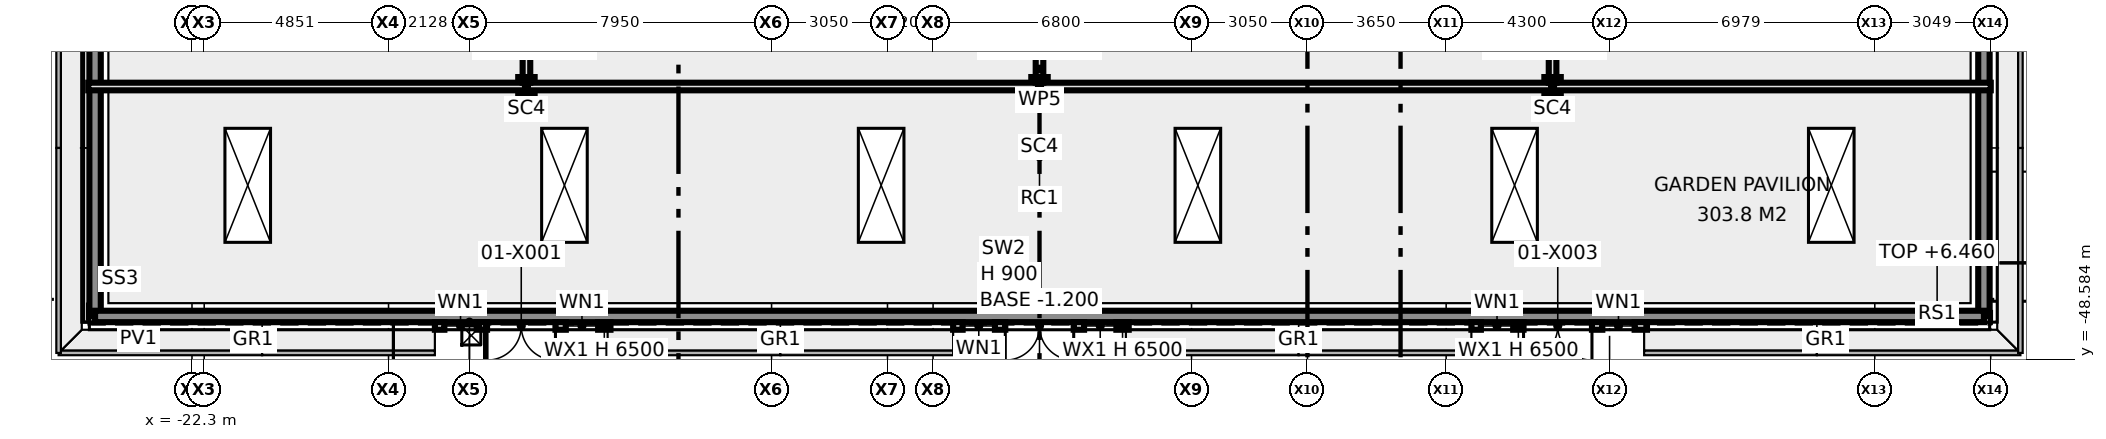
"""IFC4 building model, lengths in metres.
Left out: names, types, materials, properties, quantities, classifications, styles, units other than length and angle.
Written with IfcOpenShell. Run it as: python <this file> out.ifc"""

import sys

from ifc_helpers import new_model, si_unit, direction, frame, frame_2d, origin, origin_2d, place, context, subcontext, project, spatial, rectangle, i_section, extrude, element, fill, save


model = new_model("IFC4")
c1 = context("Model", 3, precision=1e-05, world=origin(), true_north=direction((0.0, 1.0)))
c2 = subcontext(c1, "Body", "Model", "MODEL_VIEW")
j1 = project(units=[si_unit("LENGTHUNIT", "METRE"), si_unit("PLANEANGLEUNIT", "RADIAN")], contexts=[c1])
p1 = place(None, origin())
s1 = spatial("IfcSite", under=j1, at=p1, CompositionType="ELEMENT")
p2 = place(p1, origin())
s2 = spatial("IfcBuilding", under=s1, at=p2, CompositionType="ELEMENT")
p3 = place(p2, origin())
s3 = spatial("IfcBuildingStorey", under=s2, at=p3, CompositionType="ELEMENT", Elevation=0.0)
for number, where, z_axis, x_axis in (
    (1, (-13.5, -41.4, -1.2), (0.0, 0.0, 1.0), (1.0, 0.0, 0.0)),
    (2, (0.0, -41.4, -1.2), (0.0, 0.0, 1.0), (1.0, 0.0, 0.0)),
    (3, (13.5, -41.4, -1.2), (0.0, 0.0, 1.0), (1.0, 0.0, 0.0)),
):
    element("IfcColumn", number, at=place(p3, frame(where, z_axis=z_axis, x_axis=x_axis)), inside=s3, PredefinedType="COLUMN", context=c2, shape_type="SweptSolid", body=[
        extrude(i_section(OverallWidth=0.432, OverallDepth=0.498, WebThickness=0.056, FlangeThickness=0.089, FilletRadius=0.015, at=origin_2d()), origin(), (0.0, 0.0, 1.0), 7.7),
    ])
for number, where, z_axis, x_axis in (
    (4, (-24.85, -47.45, -1.2), (0.0, 0.0, 1.0), (0.0, 1.0, 0.0)),
    (5, (24.85, -24.128, -1.2), (0.0, 0.0, 1.0), (0.0, -1.0, 0.0)),
):
    element("IfcWall", number, at=place(p3, frame(where, z_axis=z_axis, x_axis=x_axis)), inside=s3, PredefinedType="SOLIDWALL", context=c2, shape_type="SweptSolid", body=[
        extrude(rectangle(XDim=23.322, YDim=0.3, at=frame_2d((11.661, 0.0))), origin(), (0.0, 0.0, 1.0), 0.9),
    ])
p4 = place(p3, frame((24.85, -47.45, -1.2), z_axis=(0.0, 0.0, 1.0), x_axis=(-1.0, 0.0, 0.0)))
e6 = element("IfcWall", 6, at=p4, inside=s3, PredefinedType="SOLIDWALL", context=c2, shape_type="SweptSolid", body=[
    extrude(rectangle(XDim=49.7, YDim=0.3, at=frame_2d((24.85, 0.0))), origin(), (0.0, 0.0, 1.0), 0.9),
])
p5 = place(p3, frame((-15.909, -47.7, 0.0), z_axis=(0.0, 0.0, 1.0), x_axis=(1.0, 0.0, 0.0)))
e7 = element("IfcWall", 7, at=p5, inside=s3, PredefinedType="STANDARD", context=c2, shape_type="SweptSolid", body=[
    extrude(rectangle(XDim=4.621, YDim=0.2, at=frame_2d((2.31, 0.0))), origin(), (0.0, 0.0, 1.0), 6.5),
])
p6 = place(p5, frame((1.373, 0.0, 0.0)))
e8 = element("IfcOpeningElement", 8, at=p6, cuts=e7, PredefinedType="OPENING", context=c2, shape_type="SweptSolid", body=[
    extrude(rectangle(XDim=1.8, YDim=2.4, at=frame_2d((0.9, 1.2))), frame((0.0, 0.11, 0.0), z_axis=(0.0, -1.0, 0.0), x_axis=(1.0, 0.0, 0.0)), (0.0, 0.0, 1.0), 0.22),
])
p7 = place(p5, frame((0.25, 0.0, 0.0)))
e9 = element("IfcOpeningElement", 9, at=p7, cuts=e7, PredefinedType="OPENING", context=c2, shape_type="SweptSolid", body=[
    extrude(rectangle(XDim=0.85, YDim=2.4, at=frame_2d((0.425, 1.2))), frame((0.0, 0.11, 0.0), z_axis=(0.0, -1.0, 0.0), x_axis=(1.0, 0.0, 0.0)), (0.0, 0.0, 1.0), 0.22),
])
p8 = place(p5, frame((3.446, 0.0, 0.0)))
e10 = element("IfcOpeningElement", 10, at=p8, cuts=e7, PredefinedType="OPENING", context=c2, shape_type="SweptSolid", body=[
    extrude(rectangle(XDim=0.85, YDim=2.4, at=frame_2d((0.425, 1.2))), frame((0.0, 0.11, 0.0), z_axis=(0.0, -1.0, 0.0), x_axis=(1.0, 0.0, 0.0)), (0.0, 0.0, 1.0), 0.22),
])
p9 = place(p3, frame((-2.273, -47.7, 0.0), z_axis=(0.0, 0.0, 1.0), x_axis=(1.0, 0.0, 0.0)))
e11 = element("IfcWall", 11, at=p9, inside=s3, PredefinedType="STANDARD", context=c2, shape_type="SweptSolid", body=[
    extrude(rectangle(XDim=4.62, YDim=0.2, at=frame_2d((2.31, 0.0))), origin(), (0.0, 0.0, 1.0), 6.5),
])
p10 = place(p9, frame((1.373, 0.0, 0.0)))
e12 = element("IfcOpeningElement", 12, at=p10, cuts=e11, PredefinedType="OPENING", context=c2, shape_type="SweptSolid", body=[
    extrude(rectangle(XDim=1.8, YDim=2.4, at=frame_2d((0.9, 1.2))), frame((0.0, 0.11, 0.0), z_axis=(0.0, -1.0, 0.0), x_axis=(1.0, 0.0, 0.0)), (0.0, 0.0, 1.0), 0.22),
])
p11 = place(p9, frame((0.25, 0.0, 0.0)))
e13 = element("IfcOpeningElement", 13, at=p11, cuts=e11, PredefinedType="OPENING", context=c2, shape_type="SweptSolid", body=[
    extrude(rectangle(XDim=0.85, YDim=2.4, at=frame_2d((0.425, 1.2))), frame((0.0, 0.11, 0.0), z_axis=(0.0, -1.0, 0.0), x_axis=(1.0, 0.0, 0.0)), (0.0, 0.0, 1.0), 0.22),
])
p12 = place(p9, frame((3.446, 0.0, 0.0)))
e14 = element("IfcOpeningElement", 14, at=p12, cuts=e11, PredefinedType="OPENING", context=c2, shape_type="SweptSolid", body=[
    extrude(rectangle(XDim=0.85, YDim=2.4, at=frame_2d((0.425, 1.2))), frame((0.0, 0.11, 0.0), z_axis=(0.0, -1.0, 0.0), x_axis=(1.0, 0.0, 0.0)), (0.0, 0.0, 1.0), 0.22),
])
p13 = place(p3, frame((11.364, -47.7, 0.0), z_axis=(0.0, 0.0, 1.0), x_axis=(1.0, 0.0, 0.0)))
e15 = element("IfcWall", 15, at=p13, inside=s3, PredefinedType="STANDARD", context=c2, shape_type="SweptSolid", body=[
    extrude(rectangle(XDim=4.621, YDim=0.2, at=frame_2d((2.31, 0.0))), origin(), (0.0, 0.0, 1.0), 6.5),
])
p14 = place(p13, frame((1.373, 0.0, 0.0)))
e16 = element("IfcOpeningElement", 16, at=p14, cuts=e15, PredefinedType="OPENING", context=c2, shape_type="SweptSolid", body=[
    extrude(rectangle(XDim=1.8, YDim=2.4, at=frame_2d((0.9, 1.2))), frame((0.0, 0.11, 0.0), z_axis=(0.0, -1.0, 0.0), x_axis=(1.0, 0.0, 0.0)), (0.0, 0.0, 1.0), 0.22),
])
p15 = place(p13, frame((0.25, 0.0, 0.0)))
e17 = element("IfcOpeningElement", 17, at=p15, cuts=e15, PredefinedType="OPENING", context=c2, shape_type="SweptSolid", body=[
    extrude(rectangle(XDim=0.85, YDim=2.4, at=frame_2d((0.425, 1.2))), frame((0.0, 0.11, 0.0), z_axis=(0.0, -1.0, 0.0), x_axis=(1.0, 0.0, 0.0)), (0.0, 0.0, 1.0), 0.22),
])
p16 = place(p13, frame((3.446, 0.0, 0.0)))
e18 = element("IfcOpeningElement", 18, at=p16, cuts=e15, PredefinedType="OPENING", context=c2, shape_type="SweptSolid", body=[
    extrude(rectangle(XDim=0.85, YDim=2.4, at=frame_2d((0.425, 1.2))), frame((0.0, 0.11, 0.0), z_axis=(0.0, -1.0, 0.0), x_axis=(1.0, 0.0, 0.0)), (0.0, 0.0, 1.0), 0.22),
])
p17 = place(p3, frame((-14.95, -47.95, -0.5), z_axis=(0.0, 0.0, 1.0), x_axis=(1.0, 0.0, 0.0)))
e19 = element("IfcColumn", 19, at=p17, inside=s3, PredefinedType="COLUMN", context=c2, shape_type="SweptSolid", body=[
    extrude(rectangle(XDim=0.4, YDim=0.4, at=origin_2d()), origin(), (0.0, 0.0, 1.0), 6.7),
])
p18 = place(p3, frame((-25.03, -41.4, 0.0), z_axis=(0.0, 0.0, 1.0), x_axis=(1.0, 0.0, 0.0)))
e20 = element("IfcWall", 20, at=p18, inside=s3, PredefinedType="PARTITIONING", context=c2, shape_type="SweptSolid", body=[
    extrude(rectangle(XDim=50.06, YDim=0.2, at=frame_2d((25.03, 0.0))), origin(), (0.0, 0.0, 1.0), 6.275),
])
for number, where, z_axis, x_axis in (
    (21, (13.5, -41.3, 0.0), (0.0, 0.0, 1.0), (0.0, 1.0, 0.0)),
    (22, (0.0, -41.3, 0.0), (0.0, 0.0, 1.0), (0.0, 1.0, 0.0)),
    (23, (-13.5, -41.3, 0.0), (0.0, 0.0, 1.0), (0.0, 1.0, 0.0)),
):
    element("IfcWall", number, at=place(p3, frame(where, z_axis=z_axis, x_axis=x_axis)), inside=s3, PredefinedType="PARTITIONING", context=c2, shape_type="SweptSolid", body=[
        extrude(rectangle(XDim=1.9, YDim=0.2, at=frame_2d((0.95, 0.0))), origin(), (0.0, 0.0, 1.0), 5.593),
    ])
p19 = place(p6, frame((1.8, 0.0, 0.0), z_axis=(0.0, 0.0, 1.0), x_axis=(-1.0, 0.0, 0.0)))
e24 = element("IfcDoor", 24, at=p19, inside=s3, OperationType="DOUBLE_DOOR_DOUBLE_SWING", PredefinedType="DOOR", context=c2, shape_type="SweptSolid", body=[
    extrude(rectangle(XDim=1.8, YDim=2.4, at=frame_2d((0.9, 1.2))), frame((0.0, 0.025, 0.0), z_axis=(0.0, -1.0, 0.0), x_axis=(1.0, 0.0, 0.0)), (0.0, 0.0, 1.0), 0.05),
])
fill(e8, e24)
p20 = place(p7, origin())
e25 = element("IfcWindow", 25, at=p20, inside=s3, PartitioningType="SINGLE_PANEL", PredefinedType="WINDOW", context=c2, shape_type="SweptSolid", body=[
    extrude(rectangle(XDim=0.85, YDim=2.4, at=frame_2d((0.425, 1.2))), frame((0.0, 0.03, 0.0), z_axis=(0.0, -1.0, 0.0), x_axis=(1.0, 0.0, 0.0)), (0.0, 0.0, 1.0), 0.06),
])
fill(e9, e25)
p21 = place(p8, origin())
e26 = element("IfcWindow", 26, at=p21, inside=s3, PartitioningType="SINGLE_PANEL", PredefinedType="WINDOW", context=c2, shape_type="SweptSolid", body=[
    extrude(rectangle(XDim=0.85, YDim=2.4, at=frame_2d((0.425, 1.2))), frame((0.0, 0.03, 0.0), z_axis=(0.0, -1.0, 0.0), x_axis=(1.0, 0.0, 0.0)), (0.0, 0.0, 1.0), 0.06),
])
fill(e10, e26)
p22 = place(p10, frame((1.8, 0.0, 0.0), z_axis=(0.0, 0.0, 1.0), x_axis=(-1.0, 0.0, 0.0)))
e27 = element("IfcDoor", 27, at=p22, inside=s3, OperationType="DOUBLE_DOOR_DOUBLE_SWING", PredefinedType="DOOR", context=c2, shape_type="SweptSolid", body=[
    extrude(rectangle(XDim=1.8, YDim=2.4, at=frame_2d((0.9, 1.2))), frame((0.0, 0.025, 0.0), z_axis=(0.0, -1.0, 0.0), x_axis=(1.0, 0.0, 0.0)), (0.0, 0.0, 1.0), 0.05),
])
fill(e12, e27)
p23 = place(p11, origin())
e28 = element("IfcWindow", 28, at=p23, inside=s3, PartitioningType="SINGLE_PANEL", PredefinedType="WINDOW", context=c2, shape_type="SweptSolid", body=[
    extrude(rectangle(XDim=0.85, YDim=2.4, at=frame_2d((0.425, 1.2))), frame((0.0, 0.03, 0.0), z_axis=(0.0, -1.0, 0.0), x_axis=(1.0, 0.0, 0.0)), (0.0, 0.0, 1.0), 0.06),
])
fill(e13, e28)
p24 = place(p12, origin())
e29 = element("IfcWindow", 29, at=p24, inside=s3, PartitioningType="SINGLE_PANEL", PredefinedType="WINDOW", context=c2, shape_type="SweptSolid", body=[
    extrude(rectangle(XDim=0.85, YDim=2.4, at=frame_2d((0.425, 1.2))), frame((0.0, 0.03, 0.0), z_axis=(0.0, -1.0, 0.0), x_axis=(1.0, 0.0, 0.0)), (0.0, 0.0, 1.0), 0.06),
])
fill(e14, e29)
p25 = place(p14, frame((1.8, 0.0, 0.0), z_axis=(0.0, 0.0, 1.0), x_axis=(-1.0, 0.0, 0.0)))
e30 = element("IfcDoor", 30, at=p25, inside=s3, OperationType="DOUBLE_DOOR_DOUBLE_SWING", PredefinedType="DOOR", context=c2, shape_type="SweptSolid", body=[
    extrude(rectangle(XDim=1.8, YDim=2.4, at=frame_2d((0.9, 1.2))), frame((0.0, 0.025, 0.0), z_axis=(0.0, -1.0, 0.0), x_axis=(1.0, 0.0, 0.0)), (0.0, 0.0, 1.0), 0.05),
])
fill(e16, e30)
p26 = place(p15, origin())
e31 = element("IfcWindow", 31, at=p26, inside=s3, PartitioningType="SINGLE_PANEL", PredefinedType="WINDOW", context=c2, shape_type="SweptSolid", body=[
    extrude(rectangle(XDim=0.85, YDim=2.4, at=frame_2d((0.425, 1.2))), frame((0.0, 0.03, 0.0), z_axis=(0.0, -1.0, 0.0), x_axis=(1.0, 0.0, 0.0)), (0.0, 0.0, 1.0), 0.06),
])
fill(e17, e31)
p27 = place(p16, origin())
e32 = element("IfcWindow", 32, at=p27, inside=s3, PartitioningType="SINGLE_PANEL", PredefinedType="WINDOW", context=c2, shape_type="SweptSolid", body=[
    extrude(rectangle(XDim=0.85, YDim=2.4, at=frame_2d((0.425, 1.2))), frame((0.0, 0.03, 0.0), z_axis=(0.0, -1.0, 0.0), x_axis=(1.0, 0.0, 0.0)), (0.0, 0.0, 1.0), 0.06),
])
fill(e18, e32)
save(model, sys.argv[1])
